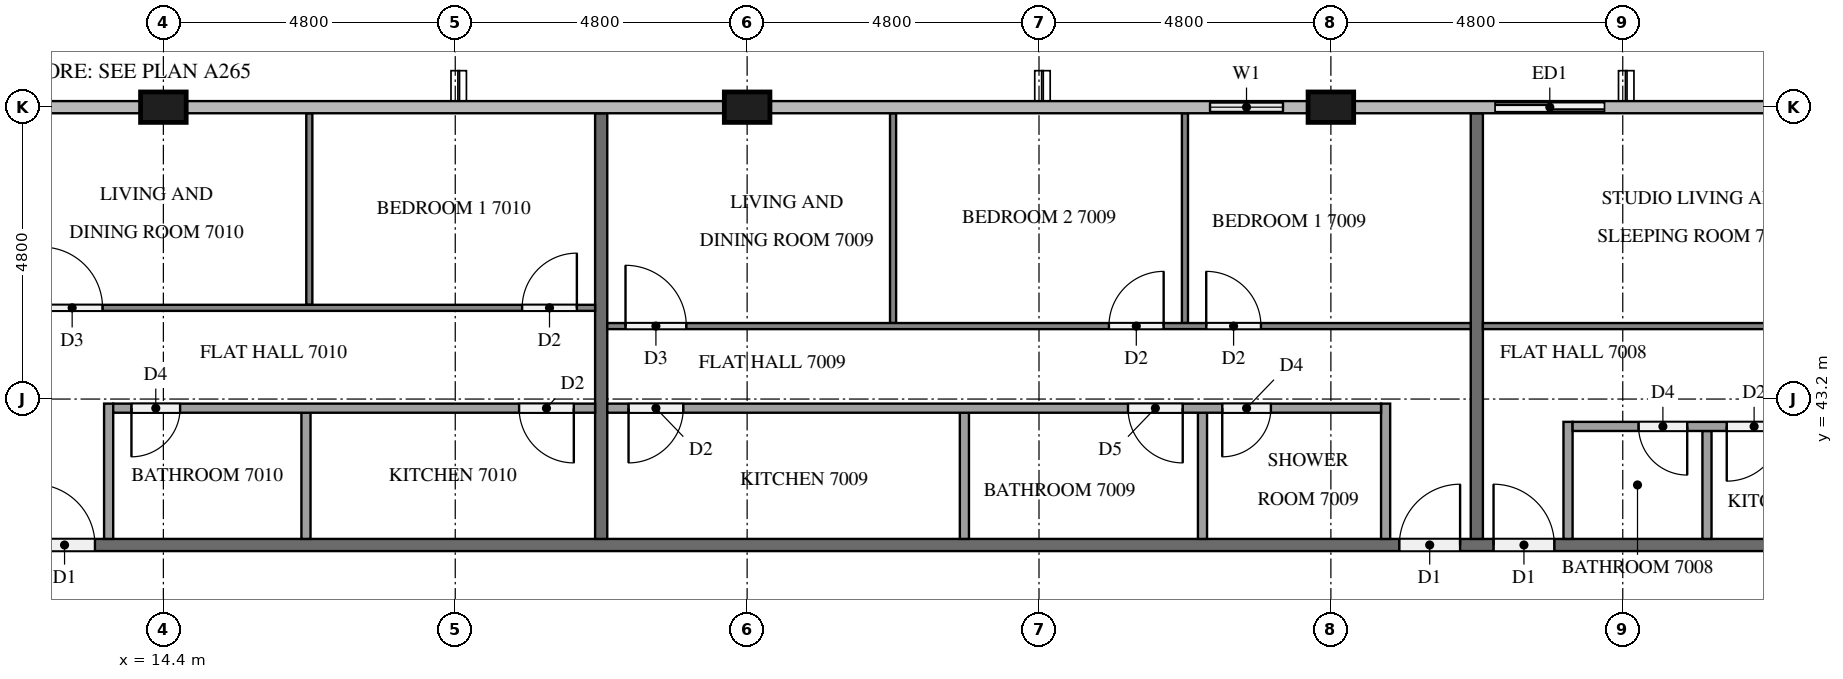
"""IFC4 building model, lengths in metres.
Left out: names, types, materials, properties, quantities, classifications, styles, units other than length and angle.
Written with IfcOpenShell. Run it as: python <this file> out.ifc"""

import sys

from ifc_helpers import new_model, si_unit, direction, frame, frame_2d, origin, origin_2d, place, context, subcontext, project, spatial, rectangle, extrude, element, fill, save


model = new_model("IFC4")
c1 = context("Model", 3, precision=1e-05, world=origin(), true_north=direction((0.0, 1.0)))
c2 = subcontext(c1, "Body", "Model", "MODEL_VIEW")
j1 = project(units=[si_unit("LENGTHUNIT", "METRE"), si_unit("PLANEANGLEUNIT", "RADIAN")], contexts=[c1])
p1 = place(None, origin())
s1 = spatial("IfcSite", under=j1, at=p1, CompositionType="ELEMENT")
p2 = place(p1, origin())
s2 = spatial("IfcBuilding", under=s1, at=p2, CompositionType="ELEMENT")
p3 = place(p2, frame((0.0, 0.0, 268.6)))
s3 = spatial("IfcBuildingStorey", under=s2, at=p3, CompositionType="ELEMENT", Elevation=268.6)
for number, where, z_axis, x_axis in (
    (1, (33.6, 48.0, 0.0), (0.0, 0.0, 1.0), (1.0, 0.0, 0.0)),
    (2, (24.0, 48.0, 0.0), (0.0, 0.0, 1.0), (1.0, 0.0, 0.0)),
    (3, (14.4, 48.0, 0.0), (0.0, 0.0, 1.0), (1.0, 0.0, 0.0)),
):
    element("IfcColumn", number, at=place(p3, frame(where, z_axis=z_axis, x_axis=x_axis)), inside=s3, PredefinedType="COLUMN", context=c2, shape_type="SweptSolid", body=[
        extrude(rectangle(XDim=0.75, YDim=0.5, at=origin_2d()), origin(), (0.0, 0.0, 1.0), 3.2),
    ])
p4 = place(p3, frame((38.4, 48.0, 0.0), z_axis=(0.0, 0.0, 1.0), x_axis=(-1.0, 0.0, 0.0)))
e4 = element("IfcWall", 4, at=p4, inside=s3, PredefinedType="SOLIDWALL", context=c2, shape_type="SweptSolid", body=[
    extrude(rectangle(XDim=2.4, YDim=0.15, at=frame_2d((1.2, 0.0))), origin(), (0.0, 0.0, 1.0), 3.2),
])
p5 = place(p4, frame((0.3, 0.0, 0.0)))
e5 = element("IfcOpeningElement", 5, at=p5, cuts=e4, PredefinedType="OPENING", context=c2, shape_type="SweptSolid", body=[
    extrude(rectangle(XDim=1.8, YDim=2.4, at=frame_2d((0.9, 1.2))), frame((0.0, 0.085, 0.0), z_axis=(0.0, -1.0, 0.0), x_axis=(1.0, 0.0, 0.0)), (0.0, 0.0, 1.0), 0.17),
])
p6 = place(p3, frame((33.225, 48.0, 0.0), z_axis=(0.0, 0.0, 1.0), x_axis=(-1.0, 0.0, 0.0)))
e6 = element("IfcWall", 6, at=p6, inside=s3, PredefinedType="SOLIDWALL", context=c2, shape_type="SweptSolid", body=[
    extrude(rectangle(XDim=2.025, YDim=0.15, at=frame_2d((1.013, 0.0))), origin(), (0.0, 0.0, 1.0), 3.2),
])
p7 = place(p6, frame((0.413, 0.0, 0.9)))
e7 = element("IfcOpeningElement", 7, at=p7, cuts=e6, PredefinedType="OPENING", context=c2, shape_type="SweptSolid", body=[
    extrude(rectangle(XDim=1.2, YDim=1.4, at=frame_2d((0.6, 0.7))), frame((0.0, 0.085, 0.0), z_axis=(0.0, -1.0, 0.0), x_axis=(1.0, 0.0, 0.0)), (0.0, 0.0, 1.0), 0.17),
])
p8 = place(p3, frame((11.9, 40.8, 0.0), z_axis=(0.0, 0.0, 1.0), x_axis=(1.0, 0.0, 0.0)))
e8 = element("IfcWall", 8, at=p8, inside=s3, PredefinedType="PARTITIONING", context=c2, shape_type="SweptSolid", body=[
    extrude(rectangle(XDim=38.6, YDim=0.2, at=frame_2d((19.3, 0.0))), origin(), (0.0, 0.0, 1.0), 3.2),
])
p9 = place(p8, frame((31.575, 0.0, 0.0)))
e9 = element("IfcOpeningElement", 9, at=p9, cuts=e8, PredefinedType="OPENING", context=c2, shape_type="SweptSolid", body=[
    extrude(rectangle(XDim=1.0, YDim=2.1, at=frame_2d((0.5, 1.05))), frame((0.0, 0.11, 0.0), z_axis=(0.0, -1.0, 0.0), x_axis=(1.0, 0.0, 0.0)), (0.0, 0.0, 1.0), 0.22),
])
p10 = place(p8, frame((24.375, 0.0, 0.0)))
e10 = element("IfcOpeningElement", 10, at=p10, cuts=e8, PredefinedType="OPENING", context=c2, shape_type="SweptSolid", body=[
    extrude(rectangle(XDim=1.0, YDim=2.1, at=frame_2d((0.5, 1.05))), frame((0.0, 0.11, 0.0), z_axis=(0.0, -1.0, 0.0), x_axis=(1.0, 0.0, 0.0)), (0.0, 0.0, 1.0), 0.22),
])
p11 = place(p8, frame((22.825, 0.0, 0.0)))
e11 = element("IfcOpeningElement", 11, at=p11, cuts=e8, PredefinedType="OPENING", context=c2, shape_type="SweptSolid", body=[
    extrude(rectangle(XDim=1.0, YDim=2.1, at=frame_2d((0.5, 1.05))), frame((0.0, 0.11, 0.0), z_axis=(0.0, -1.0, 0.0), x_axis=(1.0, 0.0, 0.0)), (0.0, 0.0, 1.0), 0.22),
])
p12 = place(p8, frame((0.375, 0.0, 0.0)))
e12 = element("IfcOpeningElement", 12, at=p12, cuts=e8, PredefinedType="OPENING", context=c2, shape_type="SweptSolid", body=[
    extrude(rectangle(XDim=1.0, YDim=2.1, at=frame_2d((0.5, 1.05))), frame((0.0, 0.11, 0.0), z_axis=(0.0, -1.0, 0.0), x_axis=(1.0, 0.0, 0.0)), (0.0, 0.0, 1.0), 0.22),
])
for number, where, z_axis, x_axis in (
    (13, (36.0, 47.9, 0.0), (0.0, 0.0, 1.0), (0.0, -1.0, 0.0)),
    (14, (21.6, 47.9, 0.0), (0.0, 0.0, 1.0), (0.0, -1.0, 0.0)),
):
    element("IfcWall", number, at=place(p3, frame(where, z_axis=z_axis, x_axis=x_axis)), inside=s3, PredefinedType="PARTITIONING", context=c2, shape_type="SweptSolid", body=[
        extrude(rectangle(XDim=7.0, YDim=0.2, at=frame_2d((3.5, 0.0))), origin(), (0.0, 0.0, 1.0), 3.2),
    ])
p13 = place(p3, frame((36.1, 44.4, 0.0), z_axis=(0.0, 0.0, 1.0), x_axis=(1.0, 0.0, 0.0)))
e15 = element("IfcWall", 15, at=p13, inside=s3, PredefinedType="PARTITIONING", context=c2, shape_type="SweptSolid", body=[
    extrude(rectangle(XDim=7.0, YDim=0.1, at=frame_2d((3.5, 0.0))), origin(), (0.0, 0.0, 1.0), 3.2),
])
p14 = place(p13, frame((5.7, 0.0, 0.0)))
e16 = element("IfcOpeningElement", 16, at=p14, cuts=e15, PredefinedType="OPENING", context=c2, shape_type="SweptSolid", body=[
    extrude(rectangle(XDim=1.0, YDim=2.1, at=frame_2d((0.5, 1.05))), frame((0.0, 0.06, 0.0), z_axis=(0.0, -1.0, 0.0), x_axis=(1.0, 0.0, 0.0)), (0.0, 0.0, 1.0), 0.12),
])
p15 = place(p3, frame((39.785, 40.9, 0.0), z_axis=(0.0, 0.0, 1.0), x_axis=(0.0, 1.0, 0.0)))
e17 = element("IfcWall", 17, at=p15, inside=s3, PredefinedType="PARTITIONING", context=c2, shape_type="SweptSolid", body=[
    extrude(rectangle(XDim=1.775, YDim=0.15, at=frame_2d((0.888, 0.0))), origin(), (0.0, 0.0, 1.0), 3.2),
])
p16 = place(p3, frame((37.5, 40.9, 0.0), z_axis=(0.0, 0.0, 1.0), x_axis=(0.0, 1.0, 0.0)))
e18 = element("IfcWall", 18, at=p16, inside=s3, PredefinedType="PARTITIONING", context=c2, shape_type="SweptSolid", body=[
    extrude(rectangle(XDim=1.925, YDim=0.15, at=frame_2d((0.962, 0.0))), origin(), (0.0, 0.0, 1.0), 3.2),
])
p17 = place(p3, frame((43.1, 42.75, 0.0), z_axis=(0.0, 0.0, 1.0), x_axis=(-1.0, 0.0, 0.0)))
e19 = element("IfcWall", 19, at=p17, inside=s3, PredefinedType="PARTITIONING", context=c2, shape_type="SweptSolid", body=[
    extrude(rectangle(XDim=5.525, YDim=0.15, at=frame_2d((2.763, 0.0))), origin(), (0.0, 0.0, 1.0), 3.2),
])
p18 = place(p17, frame((3.64, 0.0, 0.0)))
e20 = element("IfcOpeningElement", 20, at=p18, cuts=e19, PredefinedType="OPENING", context=c2, shape_type="SweptSolid", body=[
    extrude(rectangle(XDim=0.8, YDim=2.1, at=frame_2d((0.4, 1.05))), frame((0.0, 0.085, 0.0), z_axis=(0.0, -1.0, 0.0), x_axis=(1.0, 0.0, 0.0)), (0.0, 0.0, 1.0), 0.17),
])
p19 = place(p17, frame((2.09, 0.0, 0.0)))
e21 = element("IfcOpeningElement", 21, at=p19, cuts=e19, PredefinedType="OPENING", context=c2, shape_type="SweptSolid", body=[
    extrude(rectangle(XDim=0.9, YDim=2.1, at=frame_2d((0.45, 1.05))), frame((0.0, 0.085, 0.0), z_axis=(0.0, -1.0, 0.0), x_axis=(1.0, 0.0, 0.0)), (0.0, 0.0, 1.0), 0.17),
])
for number, where, z_axis, x_axis in (
    (22, (31.2, 44.45, 0.0), (0.0, 0.0, 1.0), (0.0, 1.0, 0.0)),
    (23, (26.4, 44.45, 0.0), (0.0, 0.0, 1.0), (0.0, 1.0, 0.0)),
):
    element("IfcWall", number, at=place(p3, frame(where, z_axis=z_axis, x_axis=x_axis)), inside=s3, PredefinedType="PARTITIONING", context=c2, shape_type="SweptSolid", body=[
        extrude(rectangle(XDim=3.45, YDim=0.1, at=frame_2d((1.725, 0.0))), origin(), (0.0, 0.0, 1.0), 3.2),
    ])
p20 = place(p3, frame((21.7, 44.4, 0.0), z_axis=(0.0, 0.0, 1.0), x_axis=(1.0, 0.0, 0.0)))
e24 = element("IfcWall", 24, at=p20, inside=s3, PredefinedType="PARTITIONING", context=c2, shape_type="SweptSolid", body=[
    extrude(rectangle(XDim=14.2, YDim=0.1, at=frame_2d((7.1, 0.0))), origin(), (0.0, 0.0, 1.0), 3.2),
])
p21 = place(p20, frame((9.85, 0.0, 0.0)))
e25 = element("IfcOpeningElement", 25, at=p21, cuts=e24, PredefinedType="OPENING", context=c2, shape_type="SweptSolid", body=[
    extrude(rectangle(XDim=0.9, YDim=2.1, at=frame_2d((0.45, 1.05))), frame((0.0, 0.06, 0.0), z_axis=(0.0, -1.0, 0.0), x_axis=(1.0, 0.0, 0.0)), (0.0, 0.0, 1.0), 0.12),
])
p22 = place(p20, frame((8.25, 0.0, 0.0)))
e26 = element("IfcOpeningElement", 26, at=p22, cuts=e24, PredefinedType="OPENING", context=c2, shape_type="SweptSolid", body=[
    extrude(rectangle(XDim=0.9, YDim=2.1, at=frame_2d((0.45, 1.05))), frame((0.0, 0.06, 0.0), z_axis=(0.0, -1.0, 0.0), x_axis=(1.0, 0.0, 0.0)), (0.0, 0.0, 1.0), 0.12),
])
p23 = place(p20, frame((0.3, 0.0, 0.0)))
e27 = element("IfcOpeningElement", 27, at=p23, cuts=e24, PredefinedType="OPENING", context=c2, shape_type="SweptSolid", body=[
    extrude(rectangle(XDim=1.0, YDim=2.1, at=frame_2d((0.5, 1.05))), frame((0.0, 0.06, 0.0), z_axis=(0.0, -1.0, 0.0), x_axis=(1.0, 0.0, 0.0)), (0.0, 0.0, 1.0), 0.12),
])
for number, where, z_axis, x_axis in (
    (28, (31.489, 40.9, 0.0), (0.0, 0.0, 1.0), (0.0, 1.0, 0.0)),
    (29, (27.573, 40.9, 0.0), (0.0, 0.0, 1.0), (0.0, 1.0, 0.0)),
):
    element("IfcWall", number, at=place(p3, frame(where, z_axis=z_axis, x_axis=x_axis)), inside=s3, PredefinedType="PARTITIONING", context=c2, shape_type="SweptSolid", body=[
        extrude(rectangle(XDim=2.075, YDim=0.15, at=frame_2d((1.038, 0.0))), origin(), (0.0, 0.0, 1.0), 3.2),
    ])
p24 = place(p3, frame((34.5, 40.9, 0.0), z_axis=(0.0, 0.0, 1.0), x_axis=(0.0, 1.0, 0.0)))
e30 = element("IfcWall", 30, at=p24, inside=s3, PredefinedType="PARTITIONING", context=c2, shape_type="SweptSolid", body=[
    extrude(rectangle(XDim=2.225, YDim=0.15, at=frame_2d((1.113, 0.0))), origin(), (0.0, 0.0, 1.0), 3.2),
])
p25 = place(p3, frame((34.425, 43.05, 0.0), z_axis=(0.0, 0.0, 1.0), x_axis=(-1.0, 0.0, 0.0)))
e31 = element("IfcWall", 31, at=p25, inside=s3, PredefinedType="PARTITIONING", context=c2, shape_type="SweptSolid", body=[
    extrude(rectangle(XDim=12.725, YDim=0.15, at=frame_2d((6.363, 0.0))), origin(), (0.0, 0.0, 1.0), 3.2),
])
p26 = place(p25, frame((1.812, 0.0, 0.0)))
e32 = element("IfcOpeningElement", 32, at=p26, cuts=e31, PredefinedType="OPENING", context=c2, shape_type="SweptSolid", body=[
    extrude(rectangle(XDim=0.8, YDim=2.1, at=frame_2d((0.4, 1.05))), frame((0.0, 0.085, 0.0), z_axis=(0.0, -1.0, 0.0), x_axis=(1.0, 0.0, 0.0)), (0.0, 0.0, 1.0), 0.17),
])
p27 = place(p25, frame((3.261, 0.0, 0.0)))
e33 = element("IfcOpeningElement", 33, at=p27, cuts=e31, PredefinedType="OPENING", context=c2, shape_type="SweptSolid", body=[
    extrude(rectangle(XDim=0.9, YDim=2.1, at=frame_2d((0.45, 1.05))), frame((0.0, 0.085, 0.0), z_axis=(0.0, -1.0, 0.0), x_axis=(1.0, 0.0, 0.0)), (0.0, 0.0, 1.0), 0.17),
])
p28 = place(p25, frame((11.475, 0.0, 0.0)))
e34 = element("IfcOpeningElement", 34, at=p28, cuts=e31, PredefinedType="OPENING", context=c2, shape_type="SweptSolid", body=[
    extrude(rectangle(XDim=0.9, YDim=2.1, at=frame_2d((0.45, 1.05))), frame((0.0, 0.085, 0.0), z_axis=(0.0, -1.0, 0.0), x_axis=(1.0, 0.0, 0.0)), (0.0, 0.0, 1.0), 0.17),
])
p29 = place(p3, frame((16.8, 44.75, 0.0), z_axis=(0.0, 0.0, 1.0), x_axis=(0.0, 1.0, 0.0)))
e35 = element("IfcWall", 35, at=p29, inside=s3, PredefinedType="PARTITIONING", context=c2, shape_type="SweptSolid", body=[
    extrude(rectangle(XDim=3.15, YDim=0.1, at=frame_2d((1.575, 0.0))), origin(), (0.0, 0.0, 1.0), 3.2),
])
p30 = place(p3, frame((12.1, 44.7, 0.0), z_axis=(0.0, 0.0, 1.0), x_axis=(1.0, 0.0, 0.0)))
e36 = element("IfcWall", 36, at=p30, inside=s3, PredefinedType="PARTITIONING", context=c2, shape_type="SweptSolid", body=[
    extrude(rectangle(XDim=9.4, YDim=0.1, at=frame_2d((4.7, 0.0))), origin(), (0.0, 0.0, 1.0), 3.2),
])
p31 = place(p30, frame((0.3, 0.0, 0.0)))
e37 = element("IfcOpeningElement", 37, at=p31, cuts=e36, PredefinedType="OPENING", context=c2, shape_type="SweptSolid", body=[
    extrude(rectangle(XDim=1.0, YDim=2.1, at=frame_2d((0.5, 1.05))), frame((0.0, 0.06, 0.0), z_axis=(0.0, -1.0, 0.0), x_axis=(1.0, 0.0, 0.0)), (0.0, 0.0, 1.0), 0.12),
])
p32 = place(p30, frame((8.2, 0.0, 0.0)))
e38 = element("IfcOpeningElement", 38, at=p32, cuts=e36, PredefinedType="OPENING", context=c2, shape_type="SweptSolid", body=[
    extrude(rectangle(XDim=0.9, YDim=2.1, at=frame_2d((0.45, 1.05))), frame((0.0, 0.06, 0.0), z_axis=(0.0, -1.0, 0.0), x_axis=(1.0, 0.0, 0.0)), (0.0, 0.0, 1.0), 0.12),
])
p33 = place(p3, frame((16.745, 40.9, 0.0), z_axis=(0.0, 0.0, 1.0), x_axis=(0.0, 1.0, 0.0)))
e39 = element("IfcWall", 39, at=p33, inside=s3, PredefinedType="PARTITIONING", context=c2, shape_type="SweptSolid", body=[
    extrude(rectangle(XDim=2.075, YDim=0.15, at=frame_2d((1.038, 0.0))), origin(), (0.0, 0.0, 1.0), 3.2),
])
p34 = place(p3, frame((13.5, 40.9, 0.0), z_axis=(0.0, 0.0, 1.0), x_axis=(0.0, 1.0, 0.0)))
e40 = element("IfcWall", 40, at=p34, inside=s3, PredefinedType="PARTITIONING", context=c2, shape_type="SweptSolid", body=[
    extrude(rectangle(XDim=2.225, YDim=0.15, at=frame_2d((1.113, 0.0))), origin(), (0.0, 0.0, 1.0), 3.2),
])
p35 = place(p3, frame((21.5, 43.05, 0.0), z_axis=(0.0, 0.0, 1.0), x_axis=(-1.0, 0.0, 0.0)))
e41 = element("IfcWall", 41, at=p35, inside=s3, PredefinedType="PARTITIONING", context=c2, shape_type="SweptSolid", body=[
    extrude(rectangle(XDim=7.925, YDim=0.15, at=frame_2d((3.962, 0.0))), origin(), (0.0, 0.0, 1.0), 3.2),
])
p36 = place(p35, frame((6.825, 0.0, 0.0)))
e42 = element("IfcOpeningElement", 42, at=p36, cuts=e41, PredefinedType="OPENING", context=c2, shape_type="SweptSolid", body=[
    extrude(rectangle(XDim=0.8, YDim=2.1, at=frame_2d((0.4, 1.05))), frame((0.0, 0.085, 0.0), z_axis=(0.0, -1.0, 0.0), x_axis=(1.0, 0.0, 0.0)), (0.0, 0.0, 1.0), 0.17),
])
p37 = place(p35, frame((0.35, 0.0, 0.0)))
e43 = element("IfcOpeningElement", 43, at=p37, cuts=e41, PredefinedType="OPENING", context=c2, shape_type="SweptSolid", body=[
    extrude(rectangle(XDim=0.9, YDim=2.1, at=frame_2d((0.45, 1.05))), frame((0.0, 0.085, 0.0), z_axis=(0.0, -1.0, 0.0), x_axis=(1.0, 0.0, 0.0)), (0.0, 0.0, 1.0), 0.17),
])
p38 = place(p5, origin())
e44 = element("IfcDoor", 44, at=p38, inside=s3, OperationType="SLIDING_TO_RIGHT", PredefinedType="DOOR", context=c2, shape_type="SweptSolid", body=[
    extrude(rectangle(XDim=1.8, YDim=2.4, at=frame_2d((0.9, 1.2))), frame((0.0, 0.025, 0.0), z_axis=(0.0, -1.0, 0.0), x_axis=(1.0, 0.0, 0.0)), (0.0, 0.0, 1.0), 0.05),
])
fill(e5, e44)
p39 = place(p7, origin())
e45 = element("IfcWindow", 45, at=p39, inside=s3, PartitioningType="SINGLE_PANEL", PredefinedType="WINDOW", context=c2, shape_type="SweptSolid", body=[
    extrude(rectangle(XDim=1.2, YDim=1.4, at=frame_2d((0.6, 0.7))), frame((0.0, 0.03, 0.0), z_axis=(0.0, -1.0, 0.0), x_axis=(1.0, 0.0, 0.0)), (0.0, 0.0, 1.0), 0.06),
])
fill(e7, e45)
p40 = place(p10, origin())
e46 = element("IfcDoor", 46, at=p40, inside=s3, OperationType="SINGLE_SWING_LEFT", PredefinedType="DOOR", context=c2, shape_type="SweptSolid", body=[
    extrude(rectangle(XDim=1.0, YDim=2.1, at=frame_2d((0.5, 1.05))), frame((0.0, 0.025, 0.0), z_axis=(0.0, -1.0, 0.0), x_axis=(1.0, 0.0, 0.0)), (0.0, 0.0, 1.0), 0.05),
])
fill(e10, e46)
p41 = place(p11, origin())
e47 = element("IfcDoor", 47, at=p41, inside=s3, OperationType="SINGLE_SWING_RIGHT", PredefinedType="DOOR", context=c2, shape_type="SweptSolid", body=[
    extrude(rectangle(XDim=1.0, YDim=2.1, at=frame_2d((0.5, 1.05))), frame((0.0, 0.025, 0.0), z_axis=(0.0, -1.0, 0.0), x_axis=(1.0, 0.0, 0.0)), (0.0, 0.0, 1.0), 0.05),
])
fill(e11, e47)
p42 = place(p12, origin())
e48 = element("IfcDoor", 48, at=p42, inside=s3, OperationType="SINGLE_SWING_LEFT", PredefinedType="DOOR", context=c2, shape_type="SweptSolid", body=[
    extrude(rectangle(XDim=1.0, YDim=2.1, at=frame_2d((0.5, 1.05))), frame((0.0, 0.025, 0.0), z_axis=(0.0, -1.0, 0.0), x_axis=(1.0, 0.0, 0.0)), (0.0, 0.0, 1.0), 0.05),
])
fill(e12, e48)
p43 = place(p18, origin())
e49 = element("IfcDoor", 49, at=p43, inside=s3, OperationType="SINGLE_SWING_LEFT", PredefinedType="DOOR", context=c2, shape_type="SweptSolid", body=[
    extrude(rectangle(XDim=0.8, YDim=2.1, at=frame_2d((0.4, 1.05))), frame((0.0, 0.025, 0.0), z_axis=(0.0, -1.0, 0.0), x_axis=(1.0, 0.0, 0.0)), (0.0, 0.0, 1.0), 0.05),
])
fill(e20, e49)
p44 = place(p19, origin())
e50 = element("IfcDoor", 50, at=p44, inside=s3, OperationType="SINGLE_SWING_RIGHT", PredefinedType="DOOR", context=c2, shape_type="SweptSolid", body=[
    extrude(rectangle(XDim=0.9, YDim=2.1, at=frame_2d((0.45, 1.05))), frame((0.0, 0.025, 0.0), z_axis=(0.0, -1.0, 0.0), x_axis=(1.0, 0.0, 0.0)), (0.0, 0.0, 1.0), 0.05),
])
fill(e21, e50)
p45 = place(p21, origin())
e51 = element("IfcDoor", 51, at=p45, inside=s3, OperationType="SINGLE_SWING_LEFT", PredefinedType="DOOR", context=c2, shape_type="SweptSolid", body=[
    extrude(rectangle(XDim=0.9, YDim=2.1, at=frame_2d((0.45, 1.05))), frame((0.0, 0.025, 0.0), z_axis=(0.0, -1.0, 0.0), x_axis=(1.0, 0.0, 0.0)), (0.0, 0.0, 1.0), 0.05),
])
fill(e25, e51)
p46 = place(p22, origin())
e52 = element("IfcDoor", 52, at=p46, inside=s3, OperationType="SINGLE_SWING_RIGHT", PredefinedType="DOOR", context=c2, shape_type="SweptSolid", body=[
    extrude(rectangle(XDim=0.9, YDim=2.1, at=frame_2d((0.45, 1.05))), frame((0.0, 0.025, 0.0), z_axis=(0.0, -1.0, 0.0), x_axis=(1.0, 0.0, 0.0)), (0.0, 0.0, 1.0), 0.05),
])
fill(e26, e52)
p47 = place(p23, origin())
e53 = element("IfcDoor", 53, at=p47, inside=s3, OperationType="SINGLE_SWING_LEFT", PredefinedType="DOOR", context=c2, shape_type="SweptSolid", body=[
    extrude(rectangle(XDim=1.0, YDim=2.1, at=frame_2d((0.5, 1.05))), frame((0.0, 0.025, 0.0), z_axis=(0.0, -1.0, 0.0), x_axis=(1.0, 0.0, 0.0)), (0.0, 0.0, 1.0), 0.05),
])
fill(e27, e53)
p48 = place(p26, origin())
e54 = element("IfcDoor", 54, at=p48, inside=s3, OperationType="SINGLE_SWING_RIGHT", PredefinedType="DOOR", context=c2, shape_type="SweptSolid", body=[
    extrude(rectangle(XDim=0.8, YDim=2.1, at=frame_2d((0.4, 1.05))), frame((0.0, 0.025, 0.0), z_axis=(0.0, -1.0, 0.0), x_axis=(1.0, 0.0, 0.0)), (0.0, 0.0, 1.0), 0.05),
])
fill(e32, e54)
p49 = place(p27, origin())
e55 = element("IfcDoor", 55, at=p49, inside=s3, OperationType="SINGLE_SWING_LEFT", PredefinedType="DOOR", context=c2, shape_type="SweptSolid", body=[
    extrude(rectangle(XDim=0.9, YDim=2.1, at=frame_2d((0.45, 1.05))), frame((0.0, 0.025, 0.0), z_axis=(0.0, -1.0, 0.0), x_axis=(1.0, 0.0, 0.0)), (0.0, 0.0, 1.0), 0.05),
])
fill(e33, e55)
p50 = place(p28, origin())
e56 = element("IfcDoor", 56, at=p50, inside=s3, OperationType="SINGLE_SWING_RIGHT", PredefinedType="DOOR", context=c2, shape_type="SweptSolid", body=[
    extrude(rectangle(XDim=0.9, YDim=2.1, at=frame_2d((0.45, 1.05))), frame((0.0, 0.025, 0.0), z_axis=(0.0, -1.0, 0.0), x_axis=(1.0, 0.0, 0.0)), (0.0, 0.0, 1.0), 0.05),
])
fill(e34, e56)
p51 = place(p31, origin())
e57 = element("IfcDoor", 57, at=p51, inside=s3, OperationType="SINGLE_SWING_LEFT", PredefinedType="DOOR", context=c2, shape_type="SweptSolid", body=[
    extrude(rectangle(XDim=1.0, YDim=2.1, at=frame_2d((0.5, 1.05))), frame((0.0, 0.025, 0.0), z_axis=(0.0, -1.0, 0.0), x_axis=(1.0, 0.0, 0.0)), (0.0, 0.0, 1.0), 0.05),
])
fill(e37, e57)
p52 = place(p32, origin())
e58 = element("IfcDoor", 58, at=p52, inside=s3, OperationType="SINGLE_SWING_RIGHT", PredefinedType="DOOR", context=c2, shape_type="SweptSolid", body=[
    extrude(rectangle(XDim=0.9, YDim=2.1, at=frame_2d((0.45, 1.05))), frame((0.0, 0.025, 0.0), z_axis=(0.0, -1.0, 0.0), x_axis=(1.0, 0.0, 0.0)), (0.0, 0.0, 1.0), 0.05),
])
fill(e38, e58)
p53 = place(p36, origin())
e59 = element("IfcDoor", 59, at=p53, inside=s3, OperationType="SINGLE_SWING_RIGHT", PredefinedType="DOOR", context=c2, shape_type="SweptSolid", body=[
    extrude(rectangle(XDim=0.8, YDim=2.1, at=frame_2d((0.4, 1.05))), frame((0.0, 0.025, 0.0), z_axis=(0.0, -1.0, 0.0), x_axis=(1.0, 0.0, 0.0)), (0.0, 0.0, 1.0), 0.05),
])
fill(e42, e59)
p54 = place(p37, origin())
e60 = element("IfcDoor", 60, at=p54, inside=s3, OperationType="SINGLE_SWING_LEFT", PredefinedType="DOOR", context=c2, shape_type="SweptSolid", body=[
    extrude(rectangle(XDim=0.9, YDim=2.1, at=frame_2d((0.45, 1.05))), frame((0.0, 0.025, 0.0), z_axis=(0.0, -1.0, 0.0), x_axis=(1.0, 0.0, 0.0)), (0.0, 0.0, 1.0), 0.05),
])
fill(e43, e60)
save(model, sys.argv[1])
